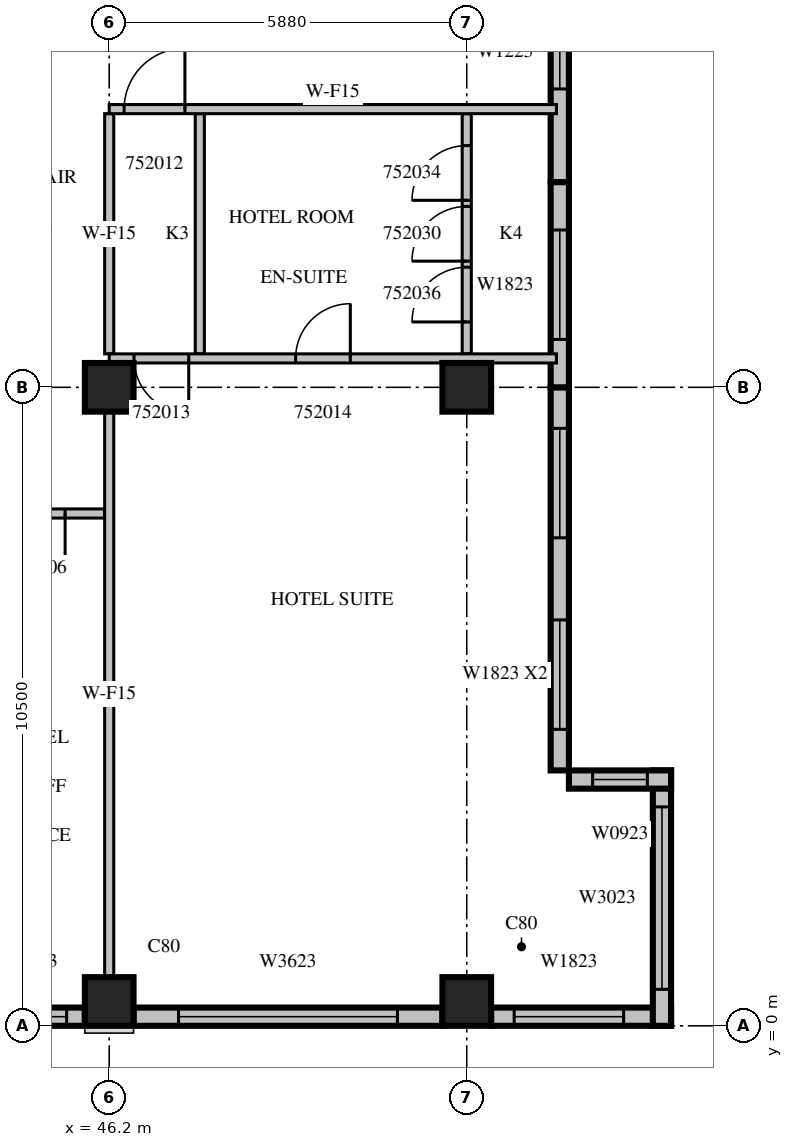
"""IFC4 building model, lengths in metres.
Left out: names, types, materials, properties, quantities, classifications, styles, units other than length and angle.
Written with IfcOpenShell. Run it as: python <this file> out.ifc"""

import sys

from ifc_helpers import new_model, si_unit, direction, frame, frame_2d, origin, origin_2d, place, context, subcontext, project, spatial, rectangle, extrude, source, transform, mapped, element, fill, save


model = new_model("IFC4")
c1 = context("Model", 3, precision=1e-05, world=origin(), true_north=direction((0.0, 1.0)))
c2 = subcontext(c1, "Body", "Model", "MODEL_VIEW")
j1 = project(units=[si_unit("LENGTHUNIT", "METRE"), si_unit("PLANEANGLEUNIT", "RADIAN")], contexts=[c1])
p1 = place(None, origin())
s1 = spatial("IfcSite", under=j1, at=p1, CompositionType="ELEMENT")
p2 = place(p1, origin())
s2 = spatial("IfcBuilding", under=s1, at=p2, CompositionType="ELEMENT")
p3 = place(p2, frame((0.0, 0.0, 231.0)))
s3 = spatial("IfcBuildingStorey", under=s2, at=p3, CompositionType="ELEMENT", Elevation=231.0)
m1 = source(origin(), c2, "Body", "SweptSolid", [
    extrude(rectangle(XDim=0.8, YDim=0.8, at=origin_2d()), origin(), (0.0, 0.0, 1.0), 3.8),
])
for number, where, z_axis, x_axis in (
    (1, (46.2, 0.4, 0.0), (0.0, 0.0, 1.0), (1.0, 0.0, 0.0)),
    (2, (52.08, 0.4, 0.0), (0.0, 0.0, 1.0), (1.0, 0.0, 0.0)),
    (3, (46.2, 10.5, 0.0), (0.0, 0.0, 1.0), (1.0, 0.0, 0.0)),
    (4, (52.08, 10.5, 0.0), (0.0, 0.0, 1.0), (1.0, 0.0, 0.0)),
):
    element("IfcColumn", number, at=place(p3, frame(where, z_axis=z_axis, x_axis=x_axis)), inside=s3, PredefinedType="COLUMN", context=c2, shape_type="MappedRepresentation", body=[
        mapped(m1, transform((0.0, 0.0, 0.0), scale=1.0)),
    ])
m2 = source(origin(), c2, "Body", "SweptSolid", [
    extrude(rectangle(XDim=1.8, YDim=0.3, at=frame_2d((0.9, 0.0))), origin(), (0.0, 0.0, 1.0), 3.4),
])
p4 = place(p3, frame((44.0, 0.15, 0.0), z_axis=(0.0, 0.0, 1.0), x_axis=(1.0, 0.0, 0.0)))
e5 = element("IfcWall", 5, at=p4, inside=s3, PredefinedType="STANDARD", context=c2, shape_type="MappedRepresentation", body=[
    mapped(m2, transform((0.0, 0.0, 0.0), scale=1.0)),
])
m3 = source(origin(), c2, "Body", "SweptSolid", [
    extrude(rectangle(XDim=1.2, YDim=2.3, at=frame_2d((0.6, 1.15))), frame((0.0, 0.16, 0.0), z_axis=(0.0, -1.0, 0.0), x_axis=(1.0, 0.0, 0.0)), (0.0, 0.0, 1.0), 0.32),
])
p5 = place(p4, frame((0.3, 0.0, 0.6)))
e6 = element("IfcOpeningElement", 6, at=p5, cuts=e5, PredefinedType="OPENING", context=c2, shape_type="MappedRepresentation", body=[
    mapped(m3, transform((0.0, 0.0, 0.0), scale=1.0)),
])
m4 = source(origin(), c2, "Body", "SweptSolid", [
    extrude(rectangle(XDim=5.08, YDim=0.3, at=frame_2d((2.54, 0.0))), origin(), (0.0, 0.0, 1.0), 3.4),
])
p6 = place(p3, frame((46.6, 0.15, 0.0), z_axis=(0.0, 0.0, 1.0), x_axis=(1.0, 0.0, 0.0)))
e7 = element("IfcWall", 7, at=p6, inside=s3, PredefinedType="STANDARD", context=c2, shape_type="MappedRepresentation", body=[
    mapped(m4, transform((0.0, 0.0, 0.0), scale=1.0)),
])
m5 = source(origin(), c2, "Body", "SweptSolid", [
    extrude(rectangle(XDim=3.6, YDim=2.3, at=frame_2d((1.8, 1.15))), frame((0.0, 0.16, 0.0), z_axis=(0.0, -1.0, 0.0), x_axis=(1.0, 0.0, 0.0)), (0.0, 0.0, 1.0), 0.32),
])
p7 = place(p6, frame((0.74, 0.0, 0.6)))
e8 = element("IfcOpeningElement", 8, at=p7, cuts=e7, PredefinedType="OPENING", context=c2, shape_type="MappedRepresentation", body=[
    mapped(m5, transform((0.0, 0.0, 0.0), scale=1.0)),
])
m6 = source(origin(), c2, "Body", "SweptSolid", [
    extrude(rectangle(XDim=2.96, YDim=0.3, at=frame_2d((1.48, 0.0))), origin(), (0.0, 0.0, 1.0), 3.4),
])
p8 = place(p3, frame((52.48, 0.15, 0.0), z_axis=(0.0, 0.0, 1.0), x_axis=(1.0, 0.0, 0.0)))
e9 = element("IfcWall", 9, at=p8, inside=s3, PredefinedType="STANDARD", context=c2, shape_type="MappedRepresentation", body=[
    mapped(m6, transform((0.0, 0.0, 0.0), scale=1.0)),
])
m7 = source(origin(), c2, "Body", "SweptSolid", [
    extrude(rectangle(XDim=1.8, YDim=2.3, at=frame_2d((0.9, 1.15))), frame((0.0, 0.16, 0.0), z_axis=(0.0, -1.0, 0.0), x_axis=(1.0, 0.0, 0.0)), (0.0, 0.0, 1.0), 0.32),
])
p9 = place(p8, frame((0.38, 0.0, 0.6)))
e10 = element("IfcOpeningElement", 10, at=p9, cuts=e9, PredefinedType="OPENING", context=c2, shape_type="MappedRepresentation", body=[
    mapped(m7, transform((0.0, 0.0, 0.0), scale=1.0)),
])
m8 = source(origin(), c2, "Body", "SweptSolid", [
    extrude(rectangle(XDim=4.2, YDim=0.3, at=frame_2d((2.1, 0.0))), origin(), (0.0, 0.0, 1.0), 3.4),
])
p10 = place(p3, frame((55.29, 0.0, 0.0), z_axis=(0.0, 0.0, 1.0), x_axis=(0.0, 1.0, 0.0)))
e11 = element("IfcWall", 11, at=p10, inside=s3, PredefinedType="STANDARD", context=c2, shape_type="MappedRepresentation", body=[
    mapped(m8, transform((0.0, 0.0, 0.0), scale=1.0)),
])
m9 = source(origin(), c2, "Body", "SweptSolid", [
    extrude(rectangle(XDim=3.0, YDim=2.3, at=frame_2d((1.5, 1.15))), frame((0.0, 0.16, 0.0), z_axis=(0.0, -1.0, 0.0), x_axis=(1.0, 0.0, 0.0)), (0.0, 0.0, 1.0), 0.32),
])
p11 = place(p10, frame((0.6, 0.0, 0.6)))
e12 = element("IfcOpeningElement", 12, at=p11, cuts=e11, PredefinedType="OPENING", context=c2, shape_type="MappedRepresentation", body=[
    mapped(m9, transform((0.0, 0.0, 0.0), scale=1.0)),
])
m10 = source(origin(), c2, "Body", "SweptSolid", [
    extrude(rectangle(XDim=1.68, YDim=0.3, at=frame_2d((0.84, 0.0))), origin(), (0.0, 0.0, 1.0), 3.4),
])
p12 = place(p3, frame((55.44, 4.05, 0.0), z_axis=(0.0, 0.0, 1.0), x_axis=(-1.0, 0.0, 0.0)))
e13 = element("IfcWall", 13, at=p12, inside=s3, PredefinedType="STANDARD", context=c2, shape_type="MappedRepresentation", body=[
    mapped(m10, transform((0.0, 0.0, 0.0), scale=1.0)),
])
m11 = source(origin(), c2, "Body", "SweptSolid", [
    extrude(rectangle(XDim=0.9, YDim=2.3, at=frame_2d((0.45, 1.15))), frame((0.0, 0.16, 0.0), z_axis=(0.0, -1.0, 0.0), x_axis=(1.0, 0.0, 0.0)), (0.0, 0.0, 1.0), 0.32),
])
p13 = place(p12, frame((0.39, 0.0, 0.6)))
e14 = element("IfcOpeningElement", 14, at=p13, cuts=e13, PredefinedType="OPENING", context=c2, shape_type="MappedRepresentation", body=[
    mapped(m11, transform((0.0, 0.0, 0.0), scale=1.0)),
])
m12 = source(origin(), c2, "Body", "SweptSolid", [
    extrude(rectangle(XDim=6.3, YDim=0.3, at=frame_2d((3.15, 0.0))), origin(), (0.0, 0.0, 1.0), 3.4),
])
p14 = place(p3, frame((53.61, 4.2, 0.0), z_axis=(0.0, 0.0, 1.0), x_axis=(0.0, 1.0, 0.0)))
e15 = element("IfcWall", 15, at=p14, inside=s3, PredefinedType="STANDARD", context=c2, shape_type="MappedRepresentation", body=[
    mapped(m12, transform((0.0, 0.0, 0.0), scale=1.0)),
])
p15 = place(p14, frame((0.675, 0.0, 0.6)))
e16 = element("IfcOpeningElement", 16, at=p15, cuts=e15, PredefinedType="OPENING", context=c2, shape_type="MappedRepresentation", body=[
    mapped(m7, transform((0.0, 0.0, 0.0), scale=1.0)),
])
p16 = place(p14, frame((3.825, 0.0, 0.6)))
e17 = element("IfcOpeningElement", 17, at=p16, cuts=e15, PredefinedType="OPENING", context=c2, shape_type="MappedRepresentation", body=[
    mapped(m7, transform((0.0, 0.0, 0.0), scale=1.0)),
])
m13 = source(origin(), c2, "Body", "SweptSolid", [
    extrude(rectangle(XDim=3.375, YDim=0.3, at=frame_2d((1.688, 0.0))), origin(), (0.0, 0.0, 1.0), 3.4),
])
p17 = place(p3, frame((53.61, 10.5, 0.0), z_axis=(0.0, 0.0, 1.0), x_axis=(0.0, 1.0, 0.0)))
e18 = element("IfcWall", 18, at=p17, inside=s3, PredefinedType="STANDARD", context=c2, shape_type="MappedRepresentation", body=[
    mapped(m13, transform((0.0, 0.0, 0.0), scale=1.0)),
])
p18 = place(p17, frame((0.787, 0.0, 0.6)))
e19 = element("IfcOpeningElement", 19, at=p18, cuts=e18, PredefinedType="OPENING", context=c2, shape_type="MappedRepresentation", body=[
    mapped(m7, transform((0.0, 0.0, 0.0), scale=1.0)),
])
p19 = place(p3, frame((53.61, 13.875, 0.0), z_axis=(0.0, 0.0, 1.0), x_axis=(0.0, 1.0, 0.0)))
e20 = element("IfcWall", 20, at=p19, inside=s3, PredefinedType="STANDARD", context=c2, shape_type="MappedRepresentation", body=[
    mapped(m13, transform((0.0, 0.0, 0.0), scale=1.0)),
])
p20 = place(p19, frame((1.531, 0.0, 0.6)))
e21 = element("IfcOpeningElement", 21, at=p20, cuts=e20, PredefinedType="OPENING", context=c2, shape_type="MappedRepresentation", body=[
    mapped(m3, transform((0.0, 0.0, 0.0), scale=1.0)),
])
m14 = source(origin(), c2, "Body", "SweptSolid", [
    extrude(rectangle(XDim=2.2, YDim=0.15, at=frame_2d((1.1, 0.0))), origin(), (0.0, 0.0, 1.0), 3.4),
])
p21 = place(p3, frame((46.125, 8.425, 0.0), z_axis=(0.0, 0.0, 1.0), x_axis=(-1.0, 0.0, 0.0)))
e22 = element("IfcWall", 22, at=p21, inside=s3, PredefinedType="PARTITIONING", context=c2, shape_type="MappedRepresentation", body=[
    mapped(m14, transform((0.0, 0.0, 0.0), scale=1.0)),
])
m15 = source(origin(), c2, "Body", "SweptSolid", [
    extrude(rectangle(XDim=0.9, YDim=2.1, at=frame_2d((0.45, 1.05))), frame((0.0, 0.085, 0.0), z_axis=(0.0, -1.0, 0.0), x_axis=(1.0, 0.0, 0.0)), (0.0, 0.0, 1.0), 0.17),
])
p22 = place(p21, frame((0.65, 0.0, 0.0)))
e23 = element("IfcOpeningElement", 23, at=p22, cuts=e22, PredefinedType="OPENING", context=c2, shape_type="MappedRepresentation", body=[
    mapped(m15, transform((0.0, 0.0, 0.0), scale=1.0)),
])
m16 = source(origin(), c2, "Body", "SweptSolid", [
    extrude(rectangle(XDim=3.95, YDim=0.15, at=frame_2d((1.975, 0.0))), origin(), (0.0, 0.0, 1.0), 3.4),
])
p23 = place(p3, frame((47.69, 11.05, 0.0), z_axis=(0.0, 0.0, 1.0), x_axis=(0.0, 1.0, 0.0)))
e24 = element("IfcWall", 24, at=p23, inside=s3, PredefinedType="PARTITIONING", context=c2, shape_type="MappedRepresentation", body=[
    mapped(m16, transform((0.0, 0.0, 0.0), scale=1.0)),
])
p24 = place(p3, frame((52.08, 11.05, 0.0), z_axis=(0.0, 0.0, 1.0), x_axis=(0.0, 1.0, 0.0)))
e25 = element("IfcWall", 25, at=p24, inside=s3, PredefinedType="PARTITIONING", context=c2, shape_type="MappedRepresentation", body=[
    mapped(m16, transform((0.0, 0.0, 0.0), scale=1.0)),
])
p25 = place(p24, frame((1.525, 0.0, 0.0)))
e26 = element("IfcOpeningElement", 26, at=p25, cuts=e25, PredefinedType="OPENING", context=c2, shape_type="MappedRepresentation", body=[
    mapped(m15, transform((0.0, 0.0, 0.0), scale=1.0)),
])
p26 = place(p24, frame((2.525, 0.0, 0.0)))
e27 = element("IfcOpeningElement", 27, at=p26, cuts=e25, PredefinedType="OPENING", context=c2, shape_type="MappedRepresentation", body=[
    mapped(m15, transform((0.0, 0.0, 0.0), scale=1.0)),
])
p27 = place(p24, frame((0.525, 0.0, 0.0)))
e28 = element("IfcOpeningElement", 28, at=p27, cuts=e25, PredefinedType="OPENING", context=c2, shape_type="MappedRepresentation", body=[
    mapped(m15, transform((0.0, 0.0, 0.0), scale=1.0)),
])
m17 = source(origin(), c2, "Body", "SweptSolid", [
    extrude(rectangle(XDim=9.302, YDim=0.15, at=frame_2d((4.651, 0.0))), origin(), (0.0, 0.0, 1.0), 3.4),
])
p28 = place(p3, frame((46.2, 0.799, 0.0), z_axis=(0.0, 0.0, 1.0), x_axis=(0.0, 1.0, 0.0)))
e29 = element("IfcWall", 29, at=p28, inside=s3, PredefinedType="PARTITIONING", context=c2, shape_type="MappedRepresentation", body=[
    mapped(m17, transform((0.0, 0.0, 0.0), scale=1.0)),
])
p29 = place(p3, frame((46.2, 11.05, 0.0), z_axis=(0.0, 0.0, 1.0), x_axis=(0.0, 1.0, 0.0)))
e30 = element("IfcWall", 30, at=p29, inside=s3, PredefinedType="PARTITIONING", context=c2, shape_type="MappedRepresentation", body=[
    mapped(m16, transform((0.0, 0.0, 0.0), scale=1.0)),
])
m18 = source(origin(), c2, "Body", "SweptSolid", [
    extrude(rectangle(XDim=7.355, YDim=0.15, at=frame_2d((3.678, 0.0))), origin(), (0.0, 0.0, 1.0), 3.4),
])
p30 = place(p3, frame((53.555, 10.975, 0.0), z_axis=(0.0, 0.0, 1.0), x_axis=(-1.0, 0.0, 0.0)))
e31 = element("IfcWall", 31, at=p30, inside=s3, PredefinedType="PARTITIONING", context=c2, shape_type="MappedRepresentation", body=[
    mapped(m18, transform((0.0, 0.0, 0.0), scale=1.0)),
])
p31 = place(p30, frame((6.047, 0.0, 0.0)))
e32 = element("IfcOpeningElement", 32, at=p31, cuts=e31, PredefinedType="OPENING", context=c2, shape_type="MappedRepresentation", body=[
    mapped(m15, transform((0.0, 0.0, 0.0), scale=1.0)),
])
p32 = place(p30, frame((3.39, 0.0, 0.0)))
e33 = element("IfcOpeningElement", 33, at=p32, cuts=e31, PredefinedType="OPENING", context=c2, shape_type="MappedRepresentation", body=[
    mapped(m15, transform((0.0, 0.0, 0.0), scale=1.0)),
])
p33 = place(p3, frame((53.555, 15.075, 0.0), z_axis=(0.0, 0.0, 1.0), x_axis=(-1.0, 0.0, 0.0)))
e34 = element("IfcWall", 34, at=p33, inside=s3, PredefinedType="PARTITIONING", context=c2, shape_type="MappedRepresentation", body=[
    mapped(m18, transform((0.0, 0.0, 0.0), scale=1.0)),
])
m19 = source(origin(), c2, "Body", "SweptSolid", [
    extrude(rectangle(XDim=1.0, YDim=2.1, at=frame_2d((0.5, 1.05))), frame((0.0, 0.085, 0.0), z_axis=(0.0, -1.0, 0.0), x_axis=(1.0, 0.0, 0.0)), (0.0, 0.0, 1.0), 0.17),
])
p34 = place(p33, frame((6.11, 0.0, 0.0)))
e35 = element("IfcOpeningElement", 35, at=p34, cuts=e34, PredefinedType="OPENING", context=c2, shape_type="MappedRepresentation", body=[
    mapped(m19, transform((0.0, 0.0, 0.0), scale=1.0)),
])
m20 = source(origin(), c2, "Body", "SweptSolid", [
    extrude(rectangle(XDim=1.2, YDim=2.3, at=frame_2d((0.6, 1.15))), frame((0.0, 0.03, 0.0), z_axis=(0.0, -1.0, 0.0), x_axis=(1.0, 0.0, 0.0)), (0.0, 0.0, 1.0), 0.06),
])
p35 = place(p5, origin())
e36 = element("IfcWindow", 36, at=p35, inside=s3, PartitioningType="SINGLE_PANEL", PredefinedType="WINDOW", context=c2, shape_type="MappedRepresentation", body=[
    mapped(m20, transform((0.0, 0.0, 0.0), scale=1.0)),
])
fill(e6, e36)
m21 = source(origin(), c2, "Body", "SweptSolid", [
    extrude(rectangle(XDim=3.6, YDim=2.3, at=frame_2d((1.8, 1.15))), frame((0.0, 0.03, 0.0), z_axis=(0.0, -1.0, 0.0), x_axis=(1.0, 0.0, 0.0)), (0.0, 0.0, 1.0), 0.06),
])
p36 = place(p7, origin())
e37 = element("IfcWindow", 37, at=p36, inside=s3, PartitioningType="SINGLE_PANEL", PredefinedType="WINDOW", context=c2, shape_type="MappedRepresentation", body=[
    mapped(m21, transform((0.0, 0.0, 0.0), scale=1.0)),
])
fill(e8, e37)
m22 = source(origin(), c2, "Body", "SweptSolid", [
    extrude(rectangle(XDim=1.8, YDim=2.3, at=frame_2d((0.9, 1.15))), frame((0.0, 0.03, 0.0), z_axis=(0.0, -1.0, 0.0), x_axis=(1.0, 0.0, 0.0)), (0.0, 0.0, 1.0), 0.06),
])
p37 = place(p9, origin())
e38 = element("IfcWindow", 38, at=p37, inside=s3, PartitioningType="SINGLE_PANEL", PredefinedType="WINDOW", context=c2, shape_type="MappedRepresentation", body=[
    mapped(m22, transform((0.0, 0.0, 0.0), scale=1.0)),
])
fill(e10, e38)
m23 = source(origin(), c2, "Body", "SweptSolid", [
    extrude(rectangle(XDim=3.0, YDim=2.3, at=frame_2d((1.5, 1.15))), frame((0.0, 0.03, 0.0), z_axis=(0.0, -1.0, 0.0), x_axis=(1.0, 0.0, 0.0)), (0.0, 0.0, 1.0), 0.06),
])
p38 = place(p11, origin())
e39 = element("IfcWindow", 39, at=p38, inside=s3, PartitioningType="SINGLE_PANEL", PredefinedType="WINDOW", context=c2, shape_type="MappedRepresentation", body=[
    mapped(m23, transform((0.0, 0.0, 0.0), scale=1.0)),
])
fill(e12, e39)
m24 = source(origin(), c2, "Body", "SweptSolid", [
    extrude(rectangle(XDim=0.9, YDim=2.3, at=frame_2d((0.45, 1.15))), frame((0.0, 0.03, 0.0), z_axis=(0.0, -1.0, 0.0), x_axis=(1.0, 0.0, 0.0)), (0.0, 0.0, 1.0), 0.06),
])
p39 = place(p13, origin())
e40 = element("IfcWindow", 40, at=p39, inside=s3, PartitioningType="SINGLE_PANEL", PredefinedType="WINDOW", context=c2, shape_type="MappedRepresentation", body=[
    mapped(m24, transform((0.0, 0.0, 0.0), scale=1.0)),
])
fill(e14, e40)
p40 = place(p15, origin())
e41 = element("IfcWindow", 41, at=p40, inside=s3, PartitioningType="SINGLE_PANEL", PredefinedType="WINDOW", context=c2, shape_type="MappedRepresentation", body=[
    mapped(m22, transform((0.0, 0.0, 0.0), scale=1.0)),
])
fill(e16, e41)
p41 = place(p16, origin())
e42 = element("IfcWindow", 42, at=p41, inside=s3, PartitioningType="SINGLE_PANEL", PredefinedType="WINDOW", context=c2, shape_type="MappedRepresentation", body=[
    mapped(m22, transform((0.0, 0.0, 0.0), scale=1.0)),
])
fill(e17, e42)
p42 = place(p18, origin())
e43 = element("IfcWindow", 43, at=p42, inside=s3, PartitioningType="SINGLE_PANEL", PredefinedType="WINDOW", context=c2, shape_type="MappedRepresentation", body=[
    mapped(m22, transform((0.0, 0.0, 0.0), scale=1.0)),
])
fill(e19, e43)
p43 = place(p20, origin())
e44 = element("IfcWindow", 44, at=p43, inside=s3, PartitioningType="SINGLE_PANEL", PredefinedType="WINDOW", context=c2, shape_type="MappedRepresentation", body=[
    mapped(m20, transform((0.0, 0.0, 0.0), scale=1.0)),
])
fill(e21, e44)
m25 = source(origin(), c2, "Body", "SweptSolid", [
    extrude(rectangle(XDim=0.9, YDim=2.1, at=frame_2d((0.45, 1.05))), frame((0.0, 0.025, 0.0), z_axis=(0.0, -1.0, 0.0), x_axis=(1.0, 0.0, 0.0)), (0.0, 0.0, 1.0), 0.05),
])
p44 = place(p22, origin())
e45 = element("IfcDoor", 45, at=p44, inside=s3, OperationType="SINGLE_SWING_LEFT", PredefinedType="DOOR", context=c2, shape_type="MappedRepresentation", body=[
    mapped(m25, transform((0.0, 0.0, 0.0), scale=1.0)),
])
fill(e23, e45)
m26 = source(origin(), c2, "Body", "SweptSolid", [
    extrude(rectangle(XDim=1.0, YDim=2.1, at=frame_2d((0.5, 1.05))), frame((0.0, 0.025, 0.0), z_axis=(0.0, -1.0, 0.0), x_axis=(1.0, 0.0, 0.0)), (0.0, 0.0, 1.0), 0.05),
])
p45 = place(p34, origin())
e46 = element("IfcDoor", 46, at=p45, inside=s3, OperationType="SINGLE_SWING_RIGHT", PredefinedType="DOOR", context=c2, shape_type="MappedRepresentation", body=[
    mapped(m26, transform((0.0, 0.0, 0.0), scale=1.0)),
])
fill(e35, e46)
p46 = place(p31, origin())
e47 = element("IfcDoor", 47, at=p46, inside=s3, OperationType="SINGLE_SWING_LEFT", PredefinedType="DOOR", context=c2, shape_type="MappedRepresentation", body=[
    mapped(m25, transform((0.0, 0.0, 0.0), scale=1.0)),
])
fill(e32, e47)
p47 = place(p32, origin())
e48 = element("IfcDoor", 48, at=p47, inside=s3, OperationType="SINGLE_SWING_RIGHT", PredefinedType="DOOR", context=c2, shape_type="MappedRepresentation", body=[
    mapped(m25, transform((0.0, 0.0, 0.0), scale=1.0)),
])
fill(e33, e48)
p48 = place(p25, origin())
e49 = element("IfcDoor", 49, at=p48, inside=s3, OperationType="SINGLE_SWING_LEFT", PredefinedType="DOOR", context=c2, shape_type="MappedRepresentation", body=[
    mapped(m25, transform((0.0, 0.0, 0.0), scale=1.0)),
])
fill(e26, e49)
p49 = place(p26, origin())
e50 = element("IfcDoor", 50, at=p49, inside=s3, OperationType="SINGLE_SWING_LEFT", PredefinedType="DOOR", context=c2, shape_type="MappedRepresentation", body=[
    mapped(m25, transform((0.0, 0.0, 0.0), scale=1.0)),
])
fill(e27, e50)
p50 = place(p27, origin())
e51 = element("IfcDoor", 51, at=p50, inside=s3, OperationType="SINGLE_SWING_LEFT", PredefinedType="DOOR", context=c2, shape_type="MappedRepresentation", body=[
    mapped(m25, transform((0.0, 0.0, 0.0), scale=1.0)),
])
fill(e28, e51)
save(model, sys.argv[1])
